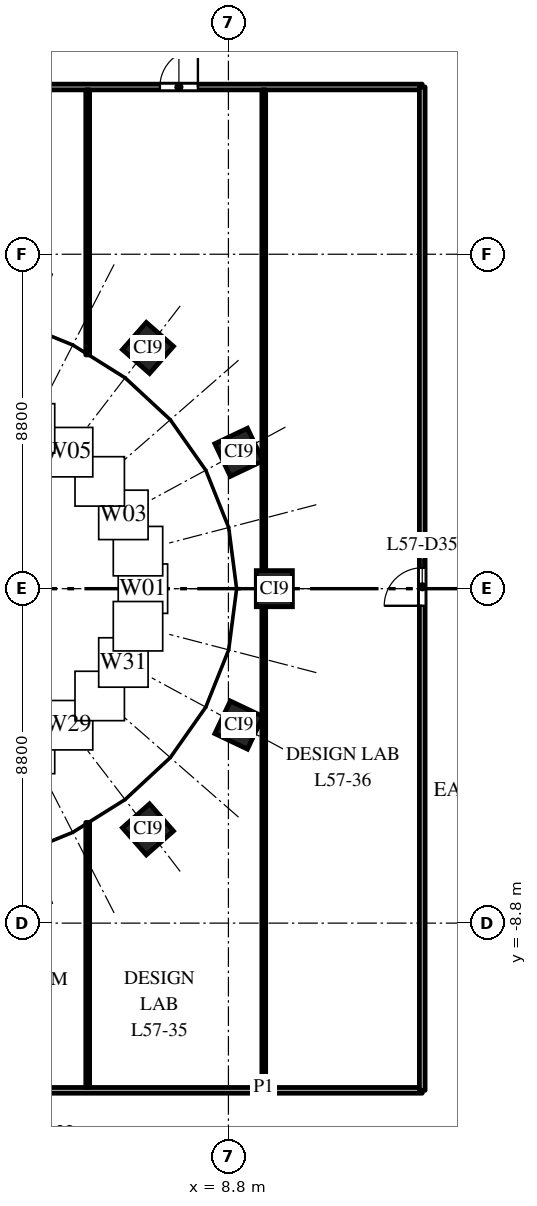
"""IFC4 building model, lengths in metres.
Left out: names, types, materials, properties, quantities, classifications, styles, units other than length and angle.
Written with IfcOpenShell. Run it as: python <this file> out.ifc"""

import sys

from ifc_helpers import new_model, si_unit, direction, frame, frame_2d, origin, origin_2d, place, context, subcontext, project, spatial, rectangle, extrude, element, fill, save


model = new_model("IFC4")
c1 = context("Model", 3, precision=1e-05, world=origin(), true_north=direction((0.0, 1.0)))
c2 = subcontext(c1, "Body", "Model", "MODEL_VIEW")
j1 = project(units=[si_unit("LENGTHUNIT", "METRE"), si_unit("PLANEANGLEUNIT", "RADIAN")], contexts=[c1])
p1 = place(None, origin())
s1 = spatial("IfcSite", under=j1, at=p1, CompositionType="ELEMENT")
p2 = place(p1, origin())
s2 = spatial("IfcBuilding", under=s1, at=p2, CompositionType="ELEMENT")
p3 = place(p2, frame((0.0, 0.0, 269.5)))
s3 = spatial("IfcBuildingStorey", under=s2, at=p3, CompositionType="ELEMENT", Elevation=269.5)
for number, where, z_axis, x_axis in (
    (1, (10.008, 0.0, 0.0), (0.0, 0.0, 1.0), (0.0, 1.0, 0.0)),
    (2, (9.076, 3.588, 0.0), (0.0, 0.0, 1.0), (-0.429, 0.903, 0.0)),
    (3, (6.682, 6.334, 0.0), (0.0, 0.0, 1.0), (-0.751, 0.66, 0.0)),
    (4, (6.682, -6.334, 0.0), (0.0, 0.0, 1.0), (0.751, 0.66, 0.0)),
    (5, (9.076, -3.588, 0.0), (0.0, 0.0, 1.0), (0.429, 0.903, 0.0)),
):
    element("IfcColumn", number, at=place(p3, frame(where, z_axis=z_axis, x_axis=x_axis)), inside=s3, PredefinedType="COLUMN", context=c2, shape_type="SweptSolid", body=[
        extrude(rectangle(XDim=0.95, YDim=0.95, at=origin_2d()), origin(), (0.0, 0.0, 1.0), 4.0),
    ])
p4 = place(p3, frame((-13.9, -13.2, 0.0), z_axis=(0.0, 0.0, 1.0), x_axis=(1.0, 0.0, 0.0)))
e6 = element("IfcWall", 6, at=p4, inside=s3, PredefinedType="PARTITIONING", context=c2, shape_type="SweptSolid", body=[
    extrude(rectangle(XDim=27.8, YDim=0.15, at=frame_2d((13.9, 0.0))), origin(), (0.0, 0.0, 1.0), 2.85),
])
p5 = place(p4, frame((6.83, 0.0, 0.0)))
e7 = element("IfcOpeningElement", 7, at=p5, cuts=e6, PredefinedType="OPENING", context=c2, shape_type="SweptSolid", body=[
    extrude(rectangle(XDim=1.0, YDim=2.1, at=frame_2d((0.5, 1.05))), frame((0.0, 0.085, 0.0), z_axis=(0.0, -1.0, 0.0), x_axis=(1.0, 0.0, 0.0)), (0.0, 0.0, 1.0), 0.17),
])
p6 = place(p4, frame((11.463, 0.0, 0.0)))
e8 = element("IfcOpeningElement", 8, at=p6, cuts=e6, PredefinedType="OPENING", context=c2, shape_type="SweptSolid", body=[
    extrude(rectangle(XDim=1.0, YDim=2.1, at=frame_2d((0.5, 1.05))), frame((0.0, 0.085, 0.0), z_axis=(0.0, -1.0, 0.0), x_axis=(1.0, 0.0, 0.0)), (0.0, 0.0, 1.0), 0.17),
])
p7 = place(p4, frame((16.097, 0.0, 0.0)))
e9 = element("IfcOpeningElement", 9, at=p7, cuts=e6, PredefinedType="OPENING", context=c2, shape_type="SweptSolid", body=[
    extrude(rectangle(XDim=1.0, YDim=2.1, at=frame_2d((0.5, 1.05))), frame((0.0, 0.085, 0.0), z_axis=(0.0, -1.0, 0.0), x_axis=(1.0, 0.0, 0.0)), (0.0, 0.0, 1.0), 0.17),
])
p8 = place(p3, frame((-13.9, 13.2, 0.0), z_axis=(0.0, 0.0, 1.0), x_axis=(1.0, 0.0, 0.0)))
e10 = element("IfcWall", 10, at=p8, inside=s3, PredefinedType="PARTITIONING", context=c2, shape_type="SweptSolid", body=[
    extrude(rectangle(XDim=27.8, YDim=0.15, at=frame_2d((13.9, 0.0))), origin(), (0.0, 0.0, 1.0), 2.85),
])
p9 = place(p8, frame((11.63, 0.0, 0.0)))
e11 = element("IfcOpeningElement", 11, at=p9, cuts=e10, PredefinedType="OPENING", context=c2, shape_type="SweptSolid", body=[
    extrude(rectangle(XDim=1.0, YDim=2.1, at=frame_2d((0.5, 1.05))), frame((0.0, 0.085, 0.0), z_axis=(0.0, -1.0, 0.0), x_axis=(1.0, 0.0, 0.0)), (0.0, 0.0, 1.0), 0.17),
])
p10 = place(p8, frame((16.263, 0.0, 0.0)))
e12 = element("IfcOpeningElement", 12, at=p10, cuts=e10, PredefinedType="OPENING", context=c2, shape_type="SweptSolid", body=[
    extrude(rectangle(XDim=1.0, YDim=2.1, at=frame_2d((0.5, 1.05))), frame((0.0, 0.085, 0.0), z_axis=(0.0, -1.0, 0.0), x_axis=(1.0, 0.0, 0.0)), (0.0, 0.0, 1.0), 0.17),
])
p11 = place(p8, frame((20.897, 0.0, 0.0)))
e13 = element("IfcOpeningElement", 13, at=p11, cuts=e10, PredefinedType="OPENING", context=c2, shape_type="SweptSolid", body=[
    extrude(rectangle(XDim=1.0, YDim=2.1, at=frame_2d((0.5, 1.05))), frame((0.0, 0.085, 0.0), z_axis=(0.0, -1.0, 0.0), x_axis=(1.0, 0.0, 0.0)), (0.0, 0.0, 1.0), 0.17),
])
for number, where, z_axis, x_axis in (
    (14, (5.097, -13.125, 0.0), (0.0, 0.0, 1.0), (0.0, 1.0, 0.0)),
    (15, (5.097, 6.151, 0.0), (0.0, 0.0, 1.0), (0.0, 1.0, 0.0)),
):
    element("IfcWall", number, at=place(p3, frame(where, z_axis=z_axis, x_axis=x_axis)), inside=s3, PredefinedType="PARTITIONING", context=c2, shape_type="SweptSolid", body=[
        extrude(rectangle(XDim=6.974, YDim=0.1, at=frame_2d((3.487, 0.0))), origin(), (0.0, 0.0, 1.0), 2.85),
    ])
p12 = place(p3, frame((9.73, -13.125, 0.0), z_axis=(0.0, 0.0, 1.0), x_axis=(0.0, 1.0, 0.0)))
e16 = element("IfcWall", 16, at=p12, inside=s3, PredefinedType="PARTITIONING", context=c2, shape_type="SweptSolid", body=[
    extrude(rectangle(XDim=26.25, YDim=0.1, at=frame_2d((13.125, 0.0))), origin(), (0.0, 0.0, 1.0), 2.75),
])
p13 = place(p3, frame((13.9, -13.2, 0.0), z_axis=(0.0, 0.0, 1.0), x_axis=(0.0, 1.0, 0.0)))
e17 = element("IfcWall", 17, at=p13, inside=s3, PredefinedType="PARTITIONING", context=c2, shape_type="SweptSolid", body=[
    extrude(rectangle(XDim=26.4, YDim=0.15, at=frame_2d((13.2, 0.0))), origin(), (0.0, 0.0, 1.0), 2.75),
])
p14 = place(p13, frame((12.75, 0.0, 0.0)))
e18 = element("IfcOpeningElement", 18, at=p14, cuts=e17, PredefinedType="OPENING", context=c2, shape_type="SweptSolid", body=[
    extrude(rectangle(XDim=1.0, YDim=2.1, at=frame_2d((0.5, 1.05))), frame((0.0, 0.085, 0.0), z_axis=(0.0, -1.0, 0.0), x_axis=(1.0, 0.0, 0.0)), (0.0, 0.0, 1.0), 0.17),
])
p15 = place(p11, origin())
e19 = element("IfcDoor", 19, at=p15, inside=s3, OperationType="SINGLE_SWING_RIGHT", PredefinedType="DOOR", context=c2, shape_type="SweptSolid", body=[
    extrude(rectangle(XDim=1.0, YDim=2.1, at=frame_2d((0.5, 1.05))), frame((0.0, 0.025, 0.0), z_axis=(0.0, -1.0, 0.0), x_axis=(1.0, 0.0, 0.0)), (0.0, 0.0, 1.0), 0.05),
])
fill(e13, e19)
p16 = place(p14, origin())
e20 = element("IfcDoor", 20, at=p16, inside=s3, OperationType="SINGLE_SWING_LEFT", PredefinedType="DOOR", context=c2, shape_type="SweptSolid", body=[
    extrude(rectangle(XDim=1.0, YDim=2.1, at=frame_2d((0.5, 1.05))), frame((0.0, 0.025, 0.0), z_axis=(0.0, -1.0, 0.0), x_axis=(1.0, 0.0, 0.0)), (0.0, 0.0, 1.0), 0.05),
])
fill(e18, e20)
save(model, sys.argv[1])
